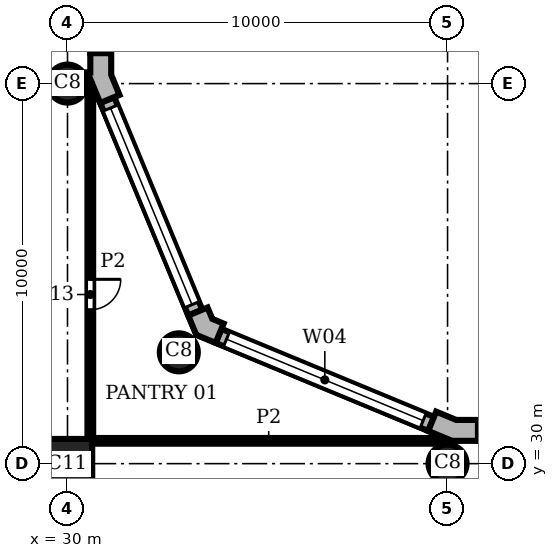
"""IFC4 building model, lengths in metres.
Left out: names, types, materials, properties, quantities, classifications, styles, units other than length and angle.
Written with IfcOpenShell. Run it as: python <this file> out.ifc"""

import sys

from ifc_helpers import new_model, si_unit, direction, frame, frame_2d, origin, origin_2d, place, context, subcontext, project, spatial, polyline, rectangle, circle, outline, extrude, element, fill, save


model = new_model("IFC4")
c1 = context("Model", 3, precision=1e-05, world=origin(), true_north=direction((0.0, 1.0)))
c2 = subcontext(c1, "Body", "Model", "MODEL_VIEW")
j1 = project(units=[si_unit("LENGTHUNIT", "METRE"), si_unit("PLANEANGLEUNIT", "RADIAN")], contexts=[c1])
p1 = place(None, origin())
s1 = spatial("IfcSite", under=j1, at=p1, CompositionType="ELEMENT")
p2 = place(p1, origin())
s2 = spatial("IfcBuilding", under=s1, at=p2, CompositionType="ELEMENT")
p3 = place(p2, frame((0.0, 0.0, 166.8)))
s3 = spatial("IfcBuildingStorey", under=s2, at=p3, CompositionType="ELEMENT", Elevation=166.8)
for number, where, z_axis, x_axis in (
    (1, (40.0, 30.0, 0.0), (0.0, 0.0, 1.0), (1.0, 0.0, 0.0)),
    (2, (32.929, 32.929, 0.0), (0.0, 0.0, 1.0), (1.0, 0.0, 0.0)),
    (3, (30.0, 40.0, 0.0), (0.0, 0.0, 1.0), (1.0, 0.0, 0.0)),
):
    element("IfcColumn", number, at=place(p3, frame(where, z_axis=z_axis, x_axis=x_axis)), inside=s3, PredefinedType="COLUMN", context=c2, shape_type="SweptSolid", body=[
        extrude(circle(Radius=0.5, at=origin_2d()), origin(), (0.0, 0.0, 1.0), 3.9),
    ])
p4 = place(p3, frame((30.0, 30.0, 0.0), z_axis=(0.0, 0.0, 1.0), x_axis=(1.0, 0.0, 0.0)))
e4 = element("IfcColumn", 4, at=p4, inside=s3, PredefinedType="COLUMN", context=c2, shape_type="SweptSolid", body=[
    extrude(rectangle(XDim=1.3, YDim=1.3, at=origin_2d()), origin(), (0.0, 0.0, 1.0), 3.9),
])
p5 = place(p3, origin())
e5 = element("IfcWall", 5, at=p5, inside=s3, PredefinedType="SOLIDWALL", context=c2, shape_type="SweptSolid", body=[
    extrude(outline(polyline([(40.8, 31.0), (40.8, 31.15), (40.229, 31.15), (39.701, 31.369), (39.644, 31.23), (39.49, 30.861), (40.119, 30.6), (40.8, 30.6), (40.8, 31.0)])), origin(), (0.0, 0.0, 1.0), 3.9),
])
e6 = element("IfcWall", 6, at=p5, inside=s3, PredefinedType="SOLIDWALL", context=c2, shape_type="SweptSolid", body=[
    extrude(outline(polyline([(34.051, 33.547), (34.108, 33.685), (33.809, 33.809), (33.685, 34.108), (33.547, 34.051), (33.177, 33.898), (33.388, 33.388), (33.898, 33.177), (34.051, 33.547)])), origin(), (0.0, 0.0, 1.0), 3.9),
])
e7 = element("IfcWall", 7, at=p5, inside=s3, PredefinedType="SOLIDWALL", context=c2, shape_type="SweptSolid", body=[
    extrude(outline(polyline([(30.62, 39.995), (30.62, 40.071), (30.861, 39.49), (31.23, 39.644), (31.369, 39.701), (31.15, 40.229), (31.15, 40.8), (31.0, 40.8), (30.6, 40.8), (30.6, 40.295), (30.5, 40.295), (30.5, 39.995), (30.62, 39.995)])), origin(), (0.0, 0.0, 1.0), 3.9),
])
p6 = place(p3, frame((59.2, 30.8, 0.0), z_axis=(0.0, 0.0, 1.0), x_axis=(-1.0, 0.0, 0.0)))
e8 = element("IfcWall", 8, at=p6, inside=s3, PredefinedType="SOLIDWALL", context=c2, shape_type="SweptSolid", body=[
    extrude(rectangle(XDim=18.4, YDim=0.4, at=frame_2d((9.2, 0.0))), origin(), (0.0, 0.0, 1.0), 3.9),
])
p7 = place(p6, frame((0.2, 0.0, 0.9)))
e9 = element("IfcOpeningElement", 9, at=p7, cuts=e8, PredefinedType="OPENING", context=c2, shape_type="SweptSolid", body=[
    extrude(rectangle(XDim=8.0, YDim=2.35, at=frame_2d((4.0, 1.175))), frame((0.0, 0.21, 0.0), z_axis=(0.0, -1.0, 0.0), x_axis=(1.0, 0.0, 0.0)), (0.0, 0.0, 1.0), 0.42),
])
p8 = place(p6, frame((10.2, 0.0, 0.9)))
e10 = element("IfcOpeningElement", 10, at=p8, cuts=e8, PredefinedType="OPENING", context=c2, shape_type="SweptSolid", body=[
    extrude(rectangle(XDim=8.0, YDim=2.35, at=frame_2d((4.0, 1.175))), frame((0.0, 0.21, 0.0), z_axis=(0.0, -1.0, 0.0), x_axis=(1.0, 0.0, 0.0)), (0.0, 0.0, 1.0), 0.42),
])
p9 = place(p3, frame((39.567, 31.045, 0.0), z_axis=(0.0, 0.0, 1.0), x_axis=(-0.923891000409, 0.382655745237, 0.0)))
e11 = element("IfcWall", 11, at=p9, inside=s3, PredefinedType="SOLIDWALL", context=c2, shape_type="SweptSolid", body=[
    extrude(rectangle(XDim=6.053, YDim=0.4, at=frame_2d((3.027, 0.0))), origin(), (0.0, 0.0, 1.0), 3.9),
])
p10 = place(p9, frame((0.227, 0.0, 0.9)))
e12 = element("IfcOpeningElement", 12, at=p10, cuts=e11, PredefinedType="OPENING", context=c2, shape_type="SweptSolid", body=[
    extrude(rectangle(XDim=5.6, YDim=2.35, at=frame_2d((2.8, 1.175))), frame((0.0, 0.21, 0.0), z_axis=(0.0, -1.0, 0.0), x_axis=(1.0, 0.0, 0.0)), (0.0, 0.0, 1.0), 0.42),
])
p11 = place(p3, frame((33.362, 33.974, 0.0), z_axis=(0.0, 0.0, 1.0), x_axis=(-0.382655745237, 0.923891000409, 0.0)))
e13 = element("IfcWall", 13, at=p11, inside=s3, PredefinedType="SOLIDWALL", context=c2, shape_type="SweptSolid", body=[
    extrude(rectangle(XDim=6.053, YDim=0.4, at=frame_2d((3.027, 0.0))), origin(), (0.0, 0.0, 1.0), 3.9),
])
p12 = place(p11, frame((0.227, 0.0, 0.9)))
e14 = element("IfcOpeningElement", 14, at=p12, cuts=e13, PredefinedType="OPENING", context=c2, shape_type="SweptSolid", body=[
    extrude(rectangle(XDim=5.6, YDim=2.35, at=frame_2d((2.8, 1.175))), frame((0.0, 0.21, 0.0), z_axis=(0.0, -1.0, 0.0), x_axis=(1.0, 0.0, 0.0)), (0.0, 0.0, 1.0), 0.42),
])
p13 = place(p3, frame((30.8, 40.8, 0.0), z_axis=(0.0, 0.0, 1.0), x_axis=(0.0, 1.0, 0.0)))
e15 = element("IfcWall", 15, at=p13, inside=s3, PredefinedType="SOLIDWALL", context=c2, shape_type="SweptSolid", body=[
    extrude(rectangle(XDim=18.4, YDim=0.4, at=frame_2d((9.2, 0.0))), origin(), (0.0, 0.0, 1.0), 3.9),
])
p14 = place(p13, frame((0.2, 0.0, 0.9)))
e16 = element("IfcOpeningElement", 16, at=p14, cuts=e15, PredefinedType="OPENING", context=c2, shape_type="SweptSolid", body=[
    extrude(rectangle(XDim=8.0, YDim=2.35, at=frame_2d((4.0, 1.175))), frame((0.0, 0.21, 0.0), z_axis=(0.0, -1.0, 0.0), x_axis=(1.0, 0.0, 0.0)), (0.0, 0.0, 1.0), 0.42),
])
p15 = place(p13, frame((10.2, 0.0, 0.9)))
e17 = element("IfcOpeningElement", 17, at=p15, cuts=e15, PredefinedType="OPENING", context=c2, shape_type="SweptSolid", body=[
    extrude(rectangle(XDim=8.0, YDim=2.35, at=frame_2d((4.0, 1.175))), frame((0.0, 0.21, 0.0), z_axis=(0.0, -1.0, 0.0), x_axis=(1.0, 0.0, 0.0)), (0.0, 0.0, 1.0), 0.42),
])
p16 = place(p3, frame((30.6, 30.65, 0.0), z_axis=(0.0, 0.0, 1.0), x_axis=(0.0, 1.0, 0.0)))
e18 = element("IfcWall", 18, at=p16, inside=s3, PredefinedType="PARTITIONING", context=c2, shape_type="SweptSolid", body=[
    extrude(rectangle(XDim=9.288, YDim=0.15, at=frame_2d((4.644, 0.0))), origin(), (0.0, 0.0, 1.0), 3.58),
])
p17 = place(p16, frame((3.4, 0.0, 0.0)))
e19 = element("IfcOpeningElement", 19, at=p17, cuts=e18, PredefinedType="OPENING", context=c2, shape_type="SweptSolid", body=[
    extrude(rectangle(XDim=0.8, YDim=2.1, at=frame_2d((0.4, 1.05))), frame((0.0, 0.085, 0.0), z_axis=(0.0, -1.0, 0.0), x_axis=(1.0, 0.0, 0.0)), (0.0, 0.0, 1.0), 0.17),
])
p18 = place(p3, frame((30.65, 30.6, 0.0), z_axis=(0.0, 0.0, 1.0), x_axis=(1.0, 0.0, 0.0)))
e20 = element("IfcWall", 20, at=p18, inside=s3, PredefinedType="PARTITIONING", context=c2, shape_type="SweptSolid", body=[
    extrude(rectangle(XDim=9.288, YDim=0.15, at=frame_2d((4.644, 0.0))), origin(), (0.0, 0.0, 1.0), 3.58),
])
p19 = place(p10, origin())
e21 = element("IfcWindow", 21, at=p19, inside=s3, PartitioningType="SINGLE_PANEL", PredefinedType="WINDOW", context=c2, shape_type="SweptSolid", body=[
    extrude(rectangle(XDim=5.6, YDim=2.35, at=frame_2d((2.8, 1.175))), frame((0.0, 0.16, 0.0), z_axis=(0.0, -1.0, 0.0), x_axis=(1.0, 0.0, 0.0)), (0.0, 0.0, 1.0), 0.06),
])
fill(e12, e21)
p20 = place(p12, origin())
e22 = element("IfcWindow", 22, at=p20, inside=s3, PartitioningType="SINGLE_PANEL", PredefinedType="WINDOW", context=c2, shape_type="SweptSolid", body=[
    extrude(rectangle(XDim=5.6, YDim=2.35, at=frame_2d((2.8, 1.175))), frame((0.0, 0.16, 0.0), z_axis=(0.0, -1.0, 0.0), x_axis=(1.0, 0.0, 0.0)), (0.0, 0.0, 1.0), 0.06),
])
fill(e14, e22)
p21 = place(p17, frame((0.8, 0.0, 0.0), z_axis=(0.0, 0.0, 1.0), x_axis=(-1.0, 0.0, 0.0)))
e23 = element("IfcDoor", 23, at=p21, inside=s3, OperationType="SINGLE_SWING_LEFT", PredefinedType="DOOR", context=c2, shape_type="SweptSolid", body=[
    extrude(rectangle(XDim=0.8, YDim=2.1, at=frame_2d((0.4, 1.05))), frame((0.0, 0.025, 0.0), z_axis=(0.0, -1.0, 0.0), x_axis=(1.0, 0.0, 0.0)), (0.0, 0.0, 1.0), 0.05),
])
fill(e19, e23)
save(model, sys.argv[1])
